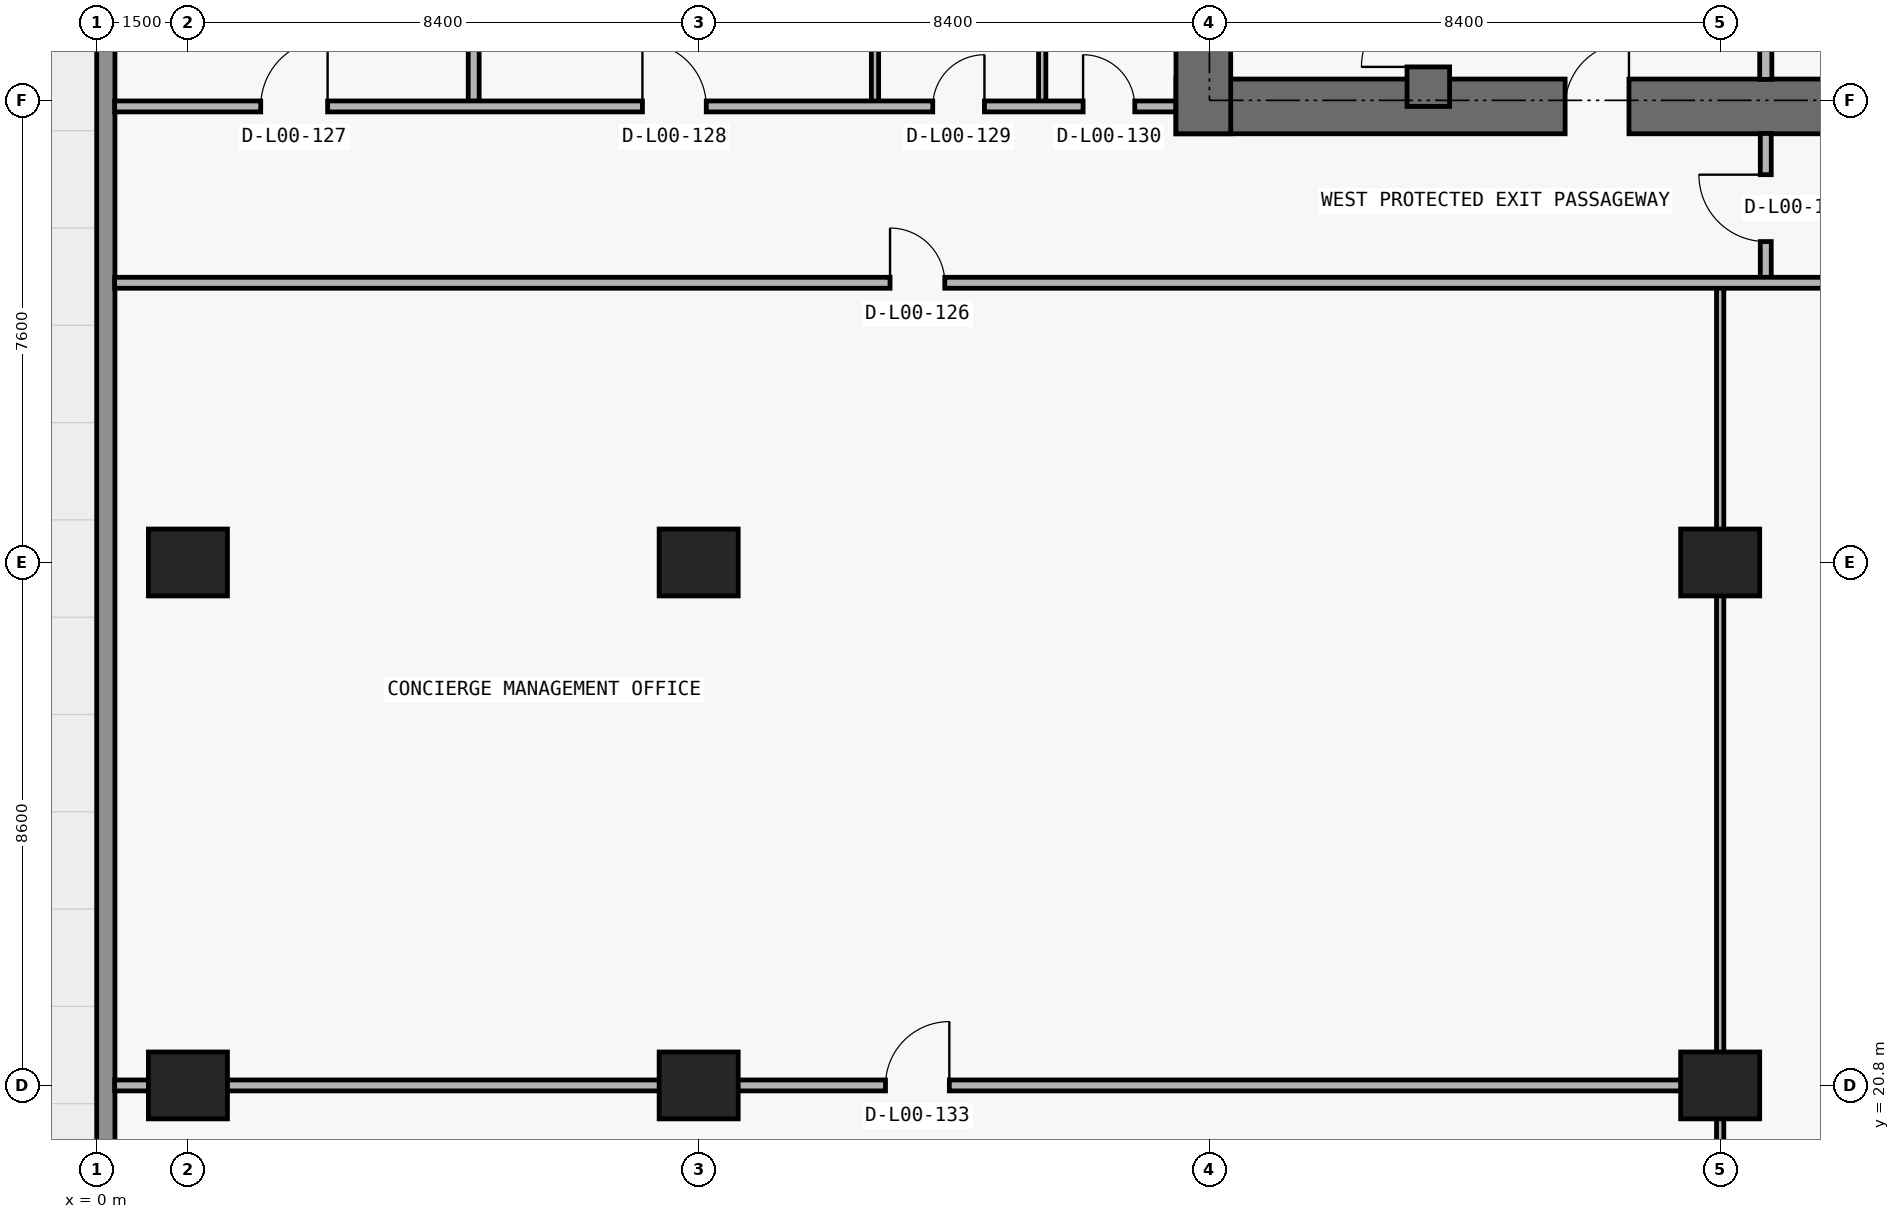
"""IFC4 building model, lengths in metres.
Left out: names, types, materials, properties, quantities, classifications, styles, units other than length and angle.
Written with IfcOpenShell. Run it as: python <this file> out.ifc"""

import sys

from ifc_helpers import new_model, si_unit, direction, frame, frame_2d, origin, origin_2d, place, context, subcontext, project, spatial, rectangle, extrude, element, fill, save


model = new_model("IFC4")
c1 = context("Model", 3, precision=1e-05, world=origin(), true_north=direction((0.0, 1.0)))
c2 = subcontext(c1, "Body", "Model", "MODEL_VIEW")
j1 = project(units=[si_unit("LENGTHUNIT", "METRE"), si_unit("PLANEANGLEUNIT", "RADIAN")], contexts=[c1])
p1 = place(None, origin())
s1 = spatial("IfcSite", under=j1, at=p1, CompositionType="ELEMENT")
p2 = place(p1, origin())
s2 = spatial("IfcBuilding", under=s1, at=p2, CompositionType="ELEMENT")
p3 = place(p2, origin())
s3 = spatial("IfcBuildingStorey", under=s2, at=p3, CompositionType="ELEMENT", Elevation=0.0)
for number, where, z_axis, x_axis in (
    (1, (1.5, 20.8, 0.0), (0.0, 0.0, 1.0), (1.0, 0.0, 0.0)),
    (2, (9.9, 20.8, 0.0), (0.0, 0.0, 1.0), (1.0, 0.0, 0.0)),
    (3, (26.7, 20.8, 0.0), (0.0, 0.0, 1.0), (1.0, 0.0, 0.0)),
    (4, (1.5, 29.4, 0.0), (0.0, 0.0, 1.0), (1.0, 0.0, 0.0)),
    (5, (9.9, 29.4, 0.0), (0.0, 0.0, 1.0), (1.0, 0.0, 0.0)),
    (6, (26.7, 29.4, 0.0), (0.0, 0.0, 1.0), (1.0, 0.0, 0.0)),
):
    element("IfcColumn", number, at=place(p3, frame(where, z_axis=z_axis, x_axis=x_axis)), inside=s3, PredefinedType="COLUMN", context=c2, shape_type="SweptSolid", body=[
        extrude(rectangle(XDim=1.3, YDim=1.1, at=origin_2d()), origin(), (0.0, 0.0, 1.0), 5.1),
    ])
p4 = place(p3, frame((17.75, 36.9, 0.0), z_axis=(0.0, 0.0, 1.0), x_axis=(1.0, 0.0, 0.0)))
e7 = element("IfcWall", 7, at=p4, inside=s3, PredefinedType="SHEAR", context=c2, shape_type="SweptSolid", body=[
    extrude(rectangle(XDim=42.3, YDim=0.9, at=frame_2d((21.15, 0.0))), origin(), (0.0, 0.0, 1.0), 5.1),
])
p5 = place(p4, frame((14.55, 0.0, 0.0)))
e8 = element("IfcOpeningElement", 8, at=p5, cuts=e7, PredefinedType="OPENING", context=c2, shape_type="SweptSolid", body=[
    extrude(rectangle(XDim=1.1, YDim=2.15, at=frame_2d((0.55, 1.075))), frame((0.0, 0.46, 0.0), z_axis=(0.0, -1.0, 0.0), x_axis=(1.0, 0.0, 0.0)), (0.0, 0.0, 1.0), 0.92),
])
p6 = place(p4, frame((6.4, 0.0, 0.0)))
e9 = element("IfcOpeningElement", 9, at=p6, cuts=e7, PredefinedType="OPENING", context=c2, shape_type="SweptSolid", body=[
    extrude(rectangle(XDim=1.05, YDim=2.15, at=frame_2d((0.525, 1.075))), frame((0.0, 0.46, 0.0), z_axis=(0.0, -1.0, 0.0), x_axis=(1.0, 0.0, 0.0)), (0.0, 0.0, 1.0), 0.92),
])
p7 = place(p4, frame((34.9, 0.0, 0.0)))
e10 = element("IfcOpeningElement", 10, at=p7, cuts=e7, PredefinedType="OPENING", context=c2, shape_type="SweptSolid", body=[
    extrude(rectangle(XDim=1.05, YDim=2.15, at=frame_2d((0.525, 1.075))), frame((0.0, 0.46, 0.0), z_axis=(0.0, -1.0, 0.0), x_axis=(1.0, 0.0, 0.0)), (0.0, 0.0, 1.0), 0.92),
])
p8 = place(p4, frame((11.012, 0.0, 0.0)))
e11 = element("IfcOpeningElement", 11, at=p8, cuts=e7, PredefinedType="OPENING", context=c2, shape_type="SweptSolid", body=[
    extrude(rectangle(XDim=1.05, YDim=2.15, at=frame_2d((0.525, 1.075))), frame((0.0, 0.46, 0.0), z_axis=(0.0, -1.0, 0.0), x_axis=(1.0, 0.0, 0.0)), (0.0, 0.0, 1.0), 0.92),
])
p9 = place(p4, frame((24.25, 0.0, 0.0)))
e12 = element("IfcOpeningElement", 12, at=p9, cuts=e7, PredefinedType="OPENING", context=c2, shape_type="SweptSolid", body=[
    extrude(rectangle(XDim=1.05, YDim=2.15, at=frame_2d((0.525, 1.075))), frame((0.0, 0.46, 0.0), z_axis=(0.0, -1.0, 0.0), x_axis=(1.0, 0.0, 0.0)), (0.0, 0.0, 1.0), 0.92),
])
p10 = place(p3, frame((18.2, 36.45, 0.0), z_axis=(0.0, 0.0, 1.0), x_axis=(0.0, 1.0, 0.0)))
e13 = element("IfcWall", 13, at=p10, inside=s3, PredefinedType="SHEAR", context=c2, shape_type="SweptSolid", body=[
    extrude(rectangle(XDim=14.15, YDim=0.9, at=frame_2d((7.075, 0.0))), origin(), (0.0, 0.0, 1.0), 5.1),
])
p11 = place(p3, frame((21.9, 36.9, 0.0), z_axis=(0.0, 0.0, 1.0), x_axis=(0.0, 1.0, 0.0)))
e14 = element("IfcWall", 14, at=p11, inside=s3, PredefinedType="SHEAR", context=c2, shape_type="SweptSolid", body=[
    extrude(rectangle(XDim=9.675, YDim=0.7, at=frame_2d((4.837, 0.0))), origin(), (0.0, 0.0, 1.0), 5.1),
])
p12 = place(p11, frame((0.65, 0.0, 0.0)))
e15 = element("IfcOpeningElement", 15, at=p12, cuts=e14, PredefinedType="OPENING", context=c2, shape_type="SweptSolid", body=[
    extrude(rectangle(XDim=1.1, YDim=2.15, at=frame_2d((0.55, 1.075))), frame((0.0, 0.36, 0.0), z_axis=(0.0, -1.0, 0.0), x_axis=(1.0, 0.0, 0.0)), (0.0, 0.0, 1.0), 0.72),
])
p13 = place(p3, frame((0.15, 0.0, 0.0), z_axis=(0.0, 0.0, 1.0), x_axis=(0.0, 1.0, 0.0)))
e16 = element("IfcWall", 16, at=p13, inside=s3, PredefinedType="STANDARD", context=c2, shape_type="SweptSolid", body=[
    extrude(rectangle(XDim=53.8, YDim=0.3, at=frame_2d((26.9, 0.0))), origin(), (0.0, 0.0, 1.0), 5.1),
])
p14 = place(p13, frame((39.5, 0.0, 0.0)))
e17 = element("IfcOpeningElement", 17, at=p14, cuts=e16, PredefinedType="OPENING", context=c2, shape_type="SweptSolid", body=[
    extrude(rectangle(XDim=1.4, YDim=2.2, at=frame_2d((0.7, 1.1))), frame((0.0, 0.16, 0.0), z_axis=(0.0, -1.0, 0.0), x_axis=(1.0, 0.0, 0.0)), (0.0, 0.0, 1.0), 0.32),
])
p15 = place(p13, frame((45.8, 0.0, 0.0)))
e18 = element("IfcOpeningElement", 18, at=p15, cuts=e16, PredefinedType="OPENING", context=c2, shape_type="SweptSolid", body=[
    extrude(rectangle(XDim=1.4, YDim=2.2, at=frame_2d((0.7, 1.1))), frame((0.0, 0.16, 0.0), z_axis=(0.0, -1.0, 0.0), x_axis=(1.0, 0.0, 0.0)), (0.0, 0.0, 1.0), 0.32),
])
p16 = place(p13, frame((49.0, 0.0, 0.0)))
e19 = element("IfcOpeningElement", 19, at=p16, cuts=e16, PredefinedType="OPENING", context=c2, shape_type="SweptSolid", body=[
    extrude(rectangle(XDim=1.4, YDim=2.2, at=frame_2d((0.7, 1.1))), frame((0.0, 0.16, 0.0), z_axis=(0.0, -1.0, 0.0), x_axis=(1.0, 0.0, 0.0)), (0.0, 0.0, 1.0), 0.32),
])
p17 = place(p3, frame((6.2, 36.9, 0.0), z_axis=(0.0, 0.0, 1.0), x_axis=(0.0, 1.0, 0.0)))
e20 = element("IfcWall", 20, at=p17, inside=s3, PredefinedType="PARTITIONING", context=c2, shape_type="SweptSolid", body=[
    extrude(rectangle(XDim=16.605, YDim=0.18, at=frame_2d((8.302, 0.0))), origin(), (0.0, 0.0, 1.0), 5.1),
])
p18 = place(p17, frame((11.153, 0.0, 0.0)))
e21 = element("IfcOpeningElement", 21, at=p18, cuts=e20, PredefinedType="OPENING", context=c2, shape_type="SweptSolid", body=[
    extrude(rectangle(XDim=1.2, YDim=2.2, at=frame_2d((0.6, 1.1))), frame((0.0, 0.1, 0.0), z_axis=(0.0, -1.0, 0.0), x_axis=(1.0, 0.0, 0.0)), (0.0, 0.0, 1.0), 0.2),
])
for number, where, z_axis, x_axis in (
    (22, (12.8, 36.9, 0.0), (0.0, 0.0, 1.0), (0.0, 1.0, 0.0)),
    (23, (15.55, 36.9, 0.0), (0.0, 0.0, 1.0), (0.0, 1.0, 0.0)),
):
    element("IfcWall", number, at=place(p3, frame(where, z_axis=z_axis, x_axis=x_axis)), inside=s3, PredefinedType="PARTITIONING", context=c2, shape_type="SweptSolid", body=[
        extrude(rectangle(XDim=6.9, YDim=0.12, at=frame_2d((3.45, 0.0))), origin(), (0.0, 0.0, 1.0), 5.1),
    ])
p19 = place(p3, frame((26.7, 0.295, 0.0), z_axis=(0.0, 0.0, 1.0), x_axis=(0.0, 1.0, 0.0)))
e24 = element("IfcWall", 24, at=p19, inside=s3, PredefinedType="PARTITIONING", context=c2, shape_type="SweptSolid", body=[
    extrude(rectangle(XDim=33.705, YDim=0.12, at=frame_2d((16.853, 0.0))), origin(), (0.0, 0.0, 1.0), 4.064),
])
p20 = place(p3, frame((27.45, 34.0, 0.0), z_axis=(0.0, 0.0, 1.0), x_axis=(0.0, 1.0, 0.0)))
e25 = element("IfcWall", 25, at=p20, inside=s3, PredefinedType="PARTITIONING", context=c2, shape_type="SweptSolid", body=[
    extrude(rectangle(XDim=2.455, YDim=0.18, at=frame_2d((1.228, 0.0))), origin(), (0.0, 0.0, 1.0), 5.1),
])
p21 = place(p20, frame((0.677, 0.0, 0.0)))
e26 = element("IfcOpeningElement", 26, at=p21, cuts=e25, PredefinedType="OPENING", context=c2, shape_type="SweptSolid", body=[
    extrude(rectangle(XDim=1.1, YDim=2.15, at=frame_2d((0.55, 1.075))), frame((0.0, 0.1, 0.0), z_axis=(0.0, -1.0, 0.0), x_axis=(1.0, 0.0, 0.0)), (0.0, 0.0, 1.0), 0.2),
])
p22 = place(p3, frame((27.45, 37.345, 0.0), z_axis=(0.0, 0.0, 1.0), x_axis=(0.0, 1.0, 0.0)))
e27 = element("IfcWall", 27, at=p22, inside=s3, PredefinedType="PARTITIONING", context=c2, shape_type="SweptSolid", body=[
    extrude(rectangle(XDim=5.385, YDim=0.2, at=frame_2d((2.692, 0.0))), origin(), (0.0, 0.0, 1.0), 5.1),
])
p23 = place(p3, frame((0.295, 20.8, 0.0), z_axis=(0.0, 0.0, 1.0), x_axis=(1.0, 0.0, 0.0)))
e28 = element("IfcWall", 28, at=p23, inside=s3, PredefinedType="PARTITIONING", context=c2, shape_type="SweptSolid", body=[
    extrude(rectangle(XDim=26.405, YDim=0.18, at=frame_2d((13.203, 0.0))), origin(), (0.0, 0.0, 1.0), 4.064),
])
p24 = place(p23, frame((12.677, 0.0, 0.0)))
e29 = element("IfcOpeningElement", 29, at=p24, cuts=e28, PredefinedType="OPENING", context=c2, shape_type="SweptSolid", body=[
    extrude(rectangle(XDim=1.05, YDim=2.15, at=frame_2d((0.525, 1.075))), frame((0.0, 0.1, 0.0), z_axis=(0.0, -1.0, 0.0), x_axis=(1.0, 0.0, 0.0)), (0.0, 0.0, 1.0), 0.2),
])
p25 = place(p3, frame((0.295, 34.0, 0.0), z_axis=(0.0, 0.0, 1.0), x_axis=(1.0, 0.0, 0.0)))
e30 = element("IfcWall", 30, at=p25, inside=s3, PredefinedType="PARTITIONING", context=c2, shape_type="SweptSolid", body=[
    extrude(rectangle(XDim=69.305, YDim=0.18, at=frame_2d((34.653, 0.0))), origin(), (0.0, 0.0, 1.0), 5.1),
])
p26 = place(p25, frame((38.13, 0.0, 0.0)))
e31 = element("IfcOpeningElement", 31, at=p26, cuts=e30, PredefinedType="OPENING", context=c2, shape_type="SweptSolid", body=[
    extrude(rectangle(XDim=1.05, YDim=2.15, at=frame_2d((0.525, 1.075))), frame((0.0, 0.1, 0.0), z_axis=(0.0, -1.0, 0.0), x_axis=(1.0, 0.0, 0.0)), (0.0, 0.0, 1.0), 0.2),
])
p27 = place(p25, frame((12.752, 0.0, 0.0)))
e32 = element("IfcOpeningElement", 32, at=p27, cuts=e30, PredefinedType="OPENING", context=c2, shape_type="SweptSolid", body=[
    extrude(rectangle(XDim=0.9, YDim=2.15, at=frame_2d((0.45, 1.075))), frame((0.0, 0.1, 0.0), z_axis=(0.0, -1.0, 0.0), x_axis=(1.0, 0.0, 0.0)), (0.0, 0.0, 1.0), 0.2),
])
p28 = place(p25, frame((54.53, 0.0, 0.0)))
e33 = element("IfcOpeningElement", 33, at=p28, cuts=e30, PredefinedType="OPENING", context=c2, shape_type="SweptSolid", body=[
    extrude(rectangle(XDim=1.05, YDim=2.15, at=frame_2d((0.525, 1.075))), frame((0.0, 0.1, 0.0), z_axis=(0.0, -1.0, 0.0), x_axis=(1.0, 0.0, 0.0)), (0.0, 0.0, 1.0), 0.2),
])
p29 = place(p3, frame((0.295, 36.9, 0.0), z_axis=(0.0, 0.0, 1.0), x_axis=(1.0, 0.0, 0.0)))
e34 = element("IfcWall", 34, at=p29, inside=s3, PredefinedType="PARTITIONING", context=c2, shape_type="SweptSolid", body=[
    extrude(rectangle(XDim=17.45, YDim=0.18, at=frame_2d((8.725, 0.0))), origin(), (0.0, 0.0, 1.0), 5.1),
])
p30 = place(p29, frame((2.403, 0.0, 0.0)))
e35 = element("IfcOpeningElement", 35, at=p30, cuts=e34, PredefinedType="OPENING", context=c2, shape_type="SweptSolid", body=[
    extrude(rectangle(XDim=1.1, YDim=2.15, at=frame_2d((0.55, 1.075))), frame((0.0, 0.1, 0.0), z_axis=(0.0, -1.0, 0.0), x_axis=(1.0, 0.0, 0.0)), (0.0, 0.0, 1.0), 0.2),
])
p31 = place(p29, frame((8.68, 0.0, 0.0)))
e36 = element("IfcOpeningElement", 36, at=p31, cuts=e34, PredefinedType="OPENING", context=c2, shape_type="SweptSolid", body=[
    extrude(rectangle(XDim=1.05, YDim=2.15, at=frame_2d((0.525, 1.075))), frame((0.0, 0.1, 0.0), z_axis=(0.0, -1.0, 0.0), x_axis=(1.0, 0.0, 0.0)), (0.0, 0.0, 1.0), 0.2),
])
p32 = place(p29, frame((13.455, 0.0, 0.0)))
e37 = element("IfcOpeningElement", 37, at=p32, cuts=e34, PredefinedType="OPENING", context=c2, shape_type="SweptSolid", body=[
    extrude(rectangle(XDim=0.85, YDim=2.1, at=frame_2d((0.425, 1.05))), frame((0.0, 0.1, 0.0), z_axis=(0.0, -1.0, 0.0), x_axis=(1.0, 0.0, 0.0)), (0.0, 0.0, 1.0), 0.2),
])
p33 = place(p29, frame((15.927, 0.0, 0.0)))
e38 = element("IfcOpeningElement", 38, at=p33, cuts=e34, PredefinedType="OPENING", context=c2, shape_type="SweptSolid", body=[
    extrude(rectangle(XDim=0.85, YDim=2.1, at=frame_2d((0.425, 1.05))), frame((0.0, 0.1, 0.0), z_axis=(0.0, -1.0, 0.0), x_axis=(1.0, 0.0, 0.0)), (0.0, 0.0, 1.0), 0.2),
])
p34 = place(p6, origin())
e39 = element("IfcDoor", 39, at=p34, inside=s3, OperationType="SINGLE_SWING_RIGHT", PredefinedType="DOOR", context=c2, shape_type="SweptSolid", body=[
    extrude(rectangle(XDim=1.05, YDim=2.15, at=frame_2d((0.525, 1.075))), frame((0.0, 0.025, 0.0), z_axis=(0.0, -1.0, 0.0), x_axis=(1.0, 0.0, 0.0)), (0.0, 0.0, 1.0), 0.05),
])
fill(e9, e39)
p35 = place(p12, origin())
e40 = element("IfcDoor", 40, at=p35, inside=s3, OperationType="SINGLE_SWING_LEFT", PredefinedType="DOOR", context=c2, shape_type="SweptSolid", body=[
    extrude(rectangle(XDim=1.1, YDim=2.15, at=frame_2d((0.55, 1.075))), frame((0.0, 0.025, 0.0), z_axis=(0.0, -1.0, 0.0), x_axis=(1.0, 0.0, 0.0)), (0.0, 0.0, 1.0), 0.05),
])
fill(e15, e40)
p36 = place(p21, origin())
e41 = element("IfcDoor", 41, at=p36, inside=s3, OperationType="SINGLE_SWING_RIGHT", PredefinedType="DOOR", context=c2, shape_type="SweptSolid", body=[
    extrude(rectangle(XDim=1.1, YDim=2.15, at=frame_2d((0.55, 1.075))), frame((0.0, 0.025, 0.0), z_axis=(0.0, -1.0, 0.0), x_axis=(1.0, 0.0, 0.0)), (0.0, 0.0, 1.0), 0.05),
])
fill(e26, e41)
p37 = place(p27, origin())
e42 = element("IfcDoor", 42, at=p37, inside=s3, OperationType="SINGLE_SWING_LEFT", PredefinedType="DOOR", context=c2, shape_type="SweptSolid", body=[
    extrude(rectangle(XDim=0.9, YDim=2.15, at=frame_2d((0.45, 1.075))), frame((0.0, 0.025, 0.0), z_axis=(0.0, -1.0, 0.0), x_axis=(1.0, 0.0, 0.0)), (0.0, 0.0, 1.0), 0.05),
])
fill(e32, e42)
p38 = place(p30, origin())
e43 = element("IfcDoor", 43, at=p38, inside=s3, OperationType="SINGLE_SWING_RIGHT", PredefinedType="DOOR", context=c2, shape_type="SweptSolid", body=[
    extrude(rectangle(XDim=1.1, YDim=2.15, at=frame_2d((0.55, 1.075))), frame((0.0, 0.025, 0.0), z_axis=(0.0, -1.0, 0.0), x_axis=(1.0, 0.0, 0.0)), (0.0, 0.0, 1.0), 0.05),
])
fill(e35, e43)
p39 = place(p31, origin())
e44 = element("IfcDoor", 44, at=p39, inside=s3, OperationType="SINGLE_SWING_LEFT", PredefinedType="DOOR", context=c2, shape_type="SweptSolid", body=[
    extrude(rectangle(XDim=1.05, YDim=2.15, at=frame_2d((0.525, 1.075))), frame((0.0, 0.025, 0.0), z_axis=(0.0, -1.0, 0.0), x_axis=(1.0, 0.0, 0.0)), (0.0, 0.0, 1.0), 0.05),
])
fill(e36, e44)
p40 = place(p32, origin())
e45 = element("IfcDoor", 45, at=p40, inside=s3, OperationType="SINGLE_SWING_RIGHT", PredefinedType="DOOR", context=c2, shape_type="SweptSolid", body=[
    extrude(rectangle(XDim=0.85, YDim=2.1, at=frame_2d((0.425, 1.05))), frame((0.0, 0.025, 0.0), z_axis=(0.0, -1.0, 0.0), x_axis=(1.0, 0.0, 0.0)), (0.0, 0.0, 1.0), 0.05),
])
fill(e37, e45)
p41 = place(p33, origin())
e46 = element("IfcDoor", 46, at=p41, inside=s3, OperationType="SINGLE_SWING_LEFT", PredefinedType="DOOR", context=c2, shape_type="SweptSolid", body=[
    extrude(rectangle(XDim=0.85, YDim=2.1, at=frame_2d((0.425, 1.05))), frame((0.0, 0.025, 0.0), z_axis=(0.0, -1.0, 0.0), x_axis=(1.0, 0.0, 0.0)), (0.0, 0.0, 1.0), 0.05),
])
fill(e38, e46)
p42 = place(p24, origin())
e47 = element("IfcDoor", 47, at=p42, inside=s3, OperationType="SINGLE_SWING_RIGHT", PredefinedType="DOOR", context=c2, shape_type="SweptSolid", body=[
    extrude(rectangle(XDim=1.05, YDim=2.15, at=frame_2d((0.525, 1.075))), frame((0.0, 0.025, 0.0), z_axis=(0.0, -1.0, 0.0), x_axis=(1.0, 0.0, 0.0)), (0.0, 0.0, 1.0), 0.05),
])
fill(e29, e47)
save(model, sys.argv[1])
